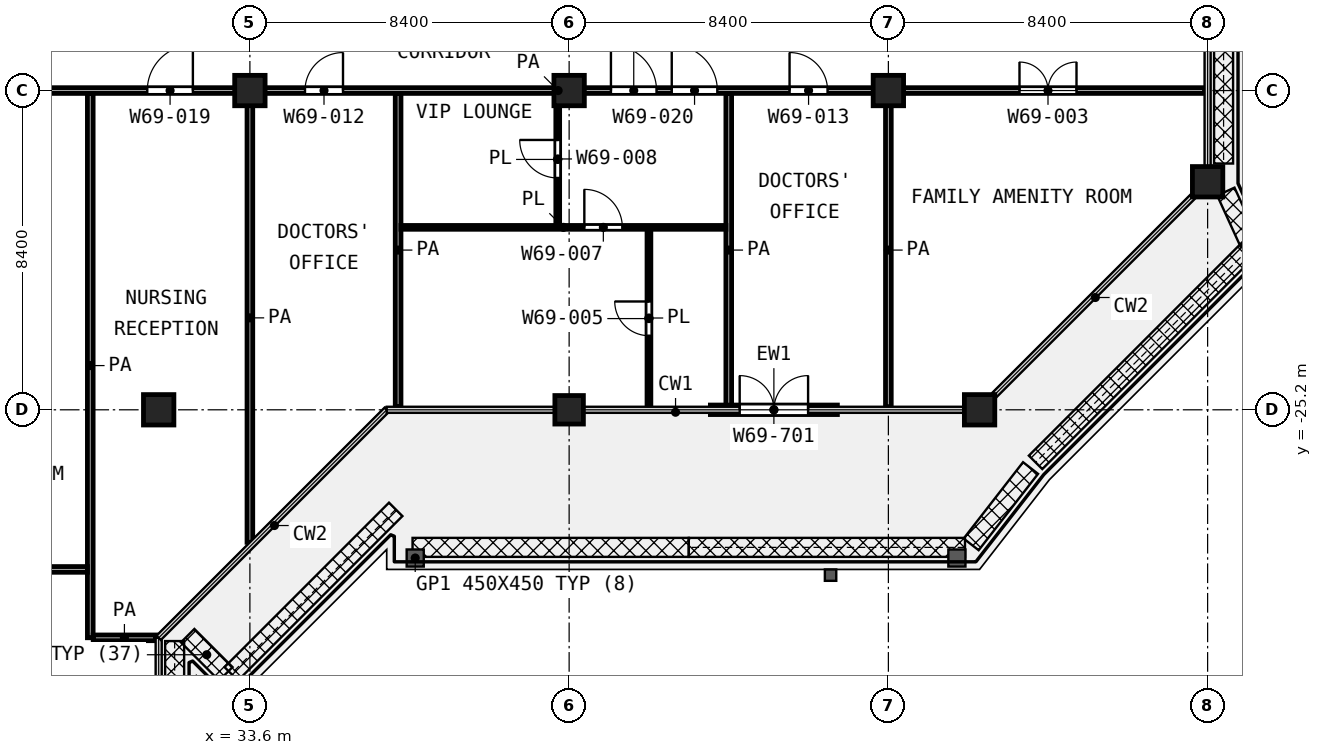
"""IFC4 building model, lengths in metres.
Left out: names, types, materials, properties, quantities, classifications, styles, units other than length and angle.
Written with IfcOpenShell. Run it as: python <this file> out.ifc"""

import sys

from ifc_helpers import new_model, si_unit, direction, frame, frame_2d, origin, origin_2d, place, context, subcontext, project, spatial, rectangle, extrude, element, fill, save


model = new_model("IFC4")
c1 = context("Model", 3, precision=1e-05, world=origin(), true_north=direction((0.0, 1.0)))
c2 = subcontext(c1, "Body", "Model", "MODEL_VIEW")
j1 = project(units=[si_unit("LENGTHUNIT", "METRE"), si_unit("PLANEANGLEUNIT", "RADIAN")], contexts=[c1])
p1 = place(None, origin())
s1 = spatial("IfcSite", under=j1, at=p1, CompositionType="ELEMENT")
p2 = place(p1, origin())
s2 = spatial("IfcBuilding", under=s1, at=p2, CompositionType="ELEMENT")
p3 = place(p2, frame((0.0, 0.0, 298.6)))
s3 = spatial("IfcBuildingStorey", under=s2, at=p3, CompositionType="ELEMENT", Elevation=298.6)
for number, where, z_axis, x_axis in (
    (1, (33.6, -16.8, 0.0), (0.0, 0.0, 1.0), (1.0, 0.0, 0.0)),
    (2, (42.0, -16.8, 0.0), (0.0, 0.0, 1.0), (1.0, 0.0, 0.0)),
    (3, (50.4, -16.8, 0.0), (0.0, 0.0, 1.0), (1.0, 0.0, 0.0)),
    (4, (58.8, -19.2, 0.0), (0.0, 0.0, 1.0), (1.0, 0.0, 0.0)),
    (5, (31.2, -25.2, 0.0), (0.0, 0.0, 1.0), (1.0, 0.0, 0.0)),
):
    element("IfcColumn", number, at=place(p3, frame(where, z_axis=z_axis, x_axis=x_axis)), inside=s3, PredefinedType="COLUMN", context=c2, shape_type="SweptSolid", body=[
        extrude(rectangle(XDim=0.8, YDim=0.8, at=origin_2d()), origin(), (0.0, 0.0, 1.0), 4.2),
    ])
p4 = place(p3, frame((42.0, -25.2, 0.0), z_axis=(0.0, 0.0, 1.0), x_axis=(1.0, 0.0, 0.0)))
e6 = element("IfcColumn", 6, at=p4, inside=s3, PredefinedType="COLUMN", context=c2, shape_type="SweptSolid", body=[
    extrude(rectangle(XDim=0.75, YDim=0.75, at=origin_2d()), origin(), (0.0, 0.0, 1.0), 4.2),
])
p5 = place(p3, frame((52.8, -25.2, 0.0), z_axis=(0.0, 0.0, 1.0), x_axis=(1.0, 0.0, 0.0)))
e7 = element("IfcColumn", 7, at=p5, inside=s3, PredefinedType="COLUMN", context=c2, shape_type="SweptSolid", body=[
    extrude(rectangle(XDim=0.8, YDim=0.8, at=origin_2d()), origin(), (0.0, 0.0, 1.0), 4.2),
])
p6 = place(p3, frame((45.717, -25.2, 0.0), z_axis=(0.0, 0.0, 1.0), x_axis=(1.0, 0.0, 0.0)))
e8 = element("IfcWall", 8, at=p6, inside=s3, PredefinedType="SOLIDWALL", context=c2, shape_type="SweptSolid", body=[
    extrude(rectangle(XDim=3.342, YDim=0.25, at=frame_2d((1.671, 0.0))), origin(), (0.0, 0.0, 1.0), 3.48),
])
p7 = place(p6, frame((0.771, 0.0, 0.0)))
e9 = element("IfcOpeningElement", 9, at=p7, cuts=e8, PredefinedType="OPENING", context=c2, shape_type="SweptSolid", body=[
    extrude(rectangle(XDim=1.8, YDim=2.1, at=frame_2d((0.9, 1.05))), frame((0.0, 0.135, 0.0), z_axis=(0.0, -1.0, 0.0), x_axis=(1.0, 0.0, 0.0)), (0.0, 0.0, 1.0), 0.27),
])
p8 = place(p3, frame((37.575, -20.4, 0.0), z_axis=(0.0, 0.0, 1.0), x_axis=(1.0, 0.0, 0.0)))
e10 = element("IfcWall", 10, at=p8, inside=s3, PredefinedType="PARTITIONING", context=c2, shape_type="SweptSolid", body=[
    extrude(rectangle(XDim=8.55, YDim=0.1, at=frame_2d((4.275, 0.0))), origin(), (0.0, 0.0, 1.0), 3.6),
])
p9 = place(p8, frame((4.825, 0.0, 0.0)))
e11 = element("IfcOpeningElement", 11, at=p9, cuts=e10, PredefinedType="OPENING", context=c2, shape_type="SweptSolid", body=[
    extrude(rectangle(XDim=1.0, YDim=2.1, at=frame_2d((0.5, 1.05))), frame((0.0, 0.06, 0.0), z_axis=(0.0, -1.0, 0.0), x_axis=(1.0, 0.0, 0.0)), (0.0, 0.0, 1.0), 0.12),
])
p10 = place(p3, frame((41.7, -20.35, 0.0), z_axis=(0.0, 0.0, 1.0), x_axis=(0.0, 1.0, 0.0)))
e12 = element("IfcWall", 12, at=p10, inside=s3, PredefinedType="PARTITIONING", context=c2, shape_type="SweptSolid", body=[
    extrude(rectangle(XDim=3.475, YDim=0.1, at=frame_2d((1.738, 0.0))), origin(), (0.0, 0.0, 1.0), 3.6),
])
p11 = place(p10, frame((1.25, 0.0, 0.0)))
e13 = element("IfcOpeningElement", 13, at=p11, cuts=e12, PredefinedType="OPENING", context=c2, shape_type="SweptSolid", body=[
    extrude(rectangle(XDim=1.0, YDim=2.1, at=frame_2d((0.5, 1.05))), frame((0.0, 0.06, 0.0), z_axis=(0.0, -1.0, 0.0), x_axis=(1.0, 0.0, 0.0)), (0.0, 0.0, 1.0), 0.12),
])
p12 = place(p3, frame((44.1, -25.12, 0.0), z_axis=(0.0, 0.0, 1.0), x_axis=(0.0, 1.0, 0.0)))
e14 = element("IfcWall", 14, at=p12, inside=s3, PredefinedType="PARTITIONING", context=c2, shape_type="SweptSolid", body=[
    extrude(rectangle(XDim=4.67, YDim=0.1, at=frame_2d((2.335, 0.0))), origin(), (0.0, 0.0, 1.0), 3.6),
])
p13 = place(p12, frame((1.87, 0.0, 0.0)))
e15 = element("IfcOpeningElement", 15, at=p13, cuts=e14, PredefinedType="OPENING", context=c2, shape_type="SweptSolid", body=[
    extrude(rectangle(XDim=0.9, YDim=2.1, at=frame_2d((0.45, 1.05))), frame((0.0, 0.06, 0.0), z_axis=(0.0, -1.0, 0.0), x_axis=(1.0, 0.0, 0.0)), (0.0, 0.0, 1.0), 0.12),
])
p14 = place(p3, frame((29.477, -31.2, 0.0), z_axis=(0.0, 0.0, 1.0), x_axis=(1.0, 0.0, 0.0)))
e16 = element("IfcWall", 16, at=p14, inside=s3, PredefinedType="PARTITIONING", context=c2, shape_type="SweptSolid", body=[
    extrude(rectangle(XDim=1.643, YDim=0.15, at=frame_2d((0.822, 0.0))), origin(), (0.0, 0.0, 1.0), 3.6),
])
p15 = place(p3, frame((16.875, -29.4, 0.0), z_axis=(0.0, 0.0, 1.0), x_axis=(1.0, 0.0, 0.0)))
e17 = element("IfcWall", 17, at=p15, inside=s3, PredefinedType="PARTITIONING", context=c2, shape_type="SweptSolid", body=[
    extrude(rectangle(XDim=12.45, YDim=0.15, at=frame_2d((6.225, 0.0))), origin(), (0.0, 0.0, 1.0), 3.6),
])
p16 = place(p3, frame((24.7, -16.8, 0.0), z_axis=(0.0, 0.0, 1.0), x_axis=(1.0, 0.0, 0.0)))
e18 = element("IfcWall", 18, at=p16, inside=s3, PredefinedType="PARTITIONING", context=c2, shape_type="SweptSolid", body=[
    extrude(rectangle(XDim=34.02, YDim=0.15, at=frame_2d((17.01, 0.0))), origin(), (0.0, 0.0, 1.0), 3.6),
])
p17 = place(p16, frame((1.85, 0.0, 0.0)))
e19 = element("IfcOpeningElement", 19, at=p17, cuts=e18, PredefinedType="OPENING", context=c2, shape_type="SweptSolid", body=[
    extrude(rectangle(XDim=1.5, YDim=2.1, at=frame_2d((0.75, 1.05))), frame((0.0, 0.085, 0.0), z_axis=(0.0, -1.0, 0.0), x_axis=(1.0, 0.0, 0.0)), (0.0, 0.0, 1.0), 0.17),
])
p18 = place(p16, frame((6.2, 0.0, 0.0)))
e20 = element("IfcOpeningElement", 20, at=p18, cuts=e18, PredefinedType="OPENING", context=c2, shape_type="SweptSolid", body=[
    extrude(rectangle(XDim=1.2, YDim=2.1, at=frame_2d((0.6, 1.05))), frame((0.0, 0.085, 0.0), z_axis=(0.0, -1.0, 0.0), x_axis=(1.0, 0.0, 0.0)), (0.0, 0.0, 1.0), 0.17),
])
p19 = place(p16, frame((10.35, 0.0, 0.0)))
e21 = element("IfcOpeningElement", 21, at=p19, cuts=e18, PredefinedType="OPENING", context=c2, shape_type="SweptSolid", body=[
    extrude(rectangle(XDim=1.0, YDim=2.1, at=frame_2d((0.5, 1.05))), frame((0.0, 0.085, 0.0), z_axis=(0.0, -1.0, 0.0), x_axis=(1.0, 0.0, 0.0)), (0.0, 0.0, 1.0), 0.17),
])
p20 = place(p16, frame((20.0, 0.0, 0.0)))
e22 = element("IfcOpeningElement", 22, at=p20, cuts=e18, PredefinedType="OPENING", context=c2, shape_type="SweptSolid", body=[
    extrude(rectangle(XDim=1.2, YDim=2.1, at=frame_2d((0.6, 1.05))), frame((0.0, 0.085, 0.0), z_axis=(0.0, -1.0, 0.0), x_axis=(1.0, 0.0, 0.0)), (0.0, 0.0, 1.0), 0.17),
])
p21 = place(p16, frame((18.4, 0.0, 0.0)))
e23 = element("IfcOpeningElement", 23, at=p21, cuts=e18, PredefinedType="OPENING", context=c2, shape_type="SweptSolid", body=[
    extrude(rectangle(XDim=1.2, YDim=2.1, at=frame_2d((0.6, 1.05))), frame((0.0, 0.085, 0.0), z_axis=(0.0, -1.0, 0.0), x_axis=(1.0, 0.0, 0.0)), (0.0, 0.0, 1.0), 0.17),
])
p22 = place(p16, frame((23.1, 0.0, 0.0)))
e24 = element("IfcOpeningElement", 24, at=p22, cuts=e18, PredefinedType="OPENING", context=c2, shape_type="SweptSolid", body=[
    extrude(rectangle(XDim=1.0, YDim=2.1, at=frame_2d((0.5, 1.05))), frame((0.0, 0.085, 0.0), z_axis=(0.0, -1.0, 0.0), x_axis=(1.0, 0.0, 0.0)), (0.0, 0.0, 1.0), 0.17),
])
p23 = place(p16, frame((29.15, 0.0, 0.0)))
e25 = element("IfcOpeningElement", 25, at=p23, cuts=e18, PredefinedType="OPENING", context=c2, shape_type="SweptSolid", body=[
    extrude(rectangle(XDim=1.5, YDim=2.1, at=frame_2d((0.75, 1.05))), frame((0.0, 0.085, 0.0), z_axis=(0.0, -1.0, 0.0), x_axis=(1.0, 0.0, 0.0)), (0.0, 0.0, 1.0), 0.17),
])
p24 = place(p3, frame((29.4, -31.198, 0.0), z_axis=(0.0, 0.0, 1.0), x_axis=(0.0, 1.0, 0.0)))
e26 = element("IfcWall", 26, at=p24, inside=s3, PredefinedType="PARTITIONING", context=c2, shape_type="SweptSolid", body=[
    extrude(rectangle(XDim=14.323, YDim=0.15, at=frame_2d((7.162, 0.0))), origin(), (0.0, 0.0, 1.0), 3.6),
])
p25 = place(p3, frame((33.6, -28.687, 0.0), z_axis=(0.0, 0.0, 1.0), x_axis=(0.0, 1.0, 0.0)))
e27 = element("IfcWall", 27, at=p25, inside=s3, PredefinedType="PARTITIONING", context=c2, shape_type="SweptSolid", body=[
    extrude(rectangle(XDim=11.812, YDim=0.15, at=frame_2d((5.906, 0.0))), origin(), (0.0, 0.0, 1.0), 3.6),
])
for number, where, z_axis, x_axis in (
    (28, (37.5, -25.12, 0.0), (0.0, 0.0, 1.0), (0.0, 1.0, 0.0)),
    (29, (46.2, -25.12, 0.0), (0.0, 0.0, 1.0), (0.0, 1.0, 0.0)),
    (30, (50.4, -25.12, 0.0), (0.0, 0.0, 1.0), (0.0, 1.0, 0.0)),
):
    element("IfcWall", number, at=place(p3, frame(where, z_axis=z_axis, x_axis=x_axis)), inside=s3, PredefinedType="PARTITIONING", context=c2, shape_type="SweptSolid", body=[
        extrude(rectangle(XDim=8.245, YDim=0.15, at=frame_2d((4.123, 0.0))), origin(), (0.0, 0.0, 1.0), 3.6),
    ])
p26 = place(p7, origin())
e31 = element("IfcDoor", 31, at=p26, inside=s3, OperationType="DOUBLE_DOOR_SINGLE_SWING", PredefinedType="DOOR", context=c2, shape_type="SweptSolid", body=[
    extrude(rectangle(XDim=1.8, YDim=2.1, at=frame_2d((0.9, 1.05))), frame((0.0, 0.025, 0.0), z_axis=(0.0, -1.0, 0.0), x_axis=(1.0, 0.0, 0.0)), (0.0, 0.0, 1.0), 0.05),
])
fill(e9, e31)
p27 = place(p18, origin())
e32 = element("IfcDoor", 32, at=p27, inside=s3, OperationType="SINGLE_SWING_RIGHT", PredefinedType="DOOR", context=c2, shape_type="SweptSolid", body=[
    extrude(rectangle(XDim=1.2, YDim=2.1, at=frame_2d((0.6, 1.05))), frame((0.0, 0.025, 0.0), z_axis=(0.0, -1.0, 0.0), x_axis=(1.0, 0.0, 0.0)), (0.0, 0.0, 1.0), 0.05),
])
fill(e20, e32)
p28 = place(p19, origin())
e33 = element("IfcDoor", 33, at=p28, inside=s3, OperationType="SINGLE_SWING_RIGHT", PredefinedType="DOOR", context=c2, shape_type="SweptSolid", body=[
    extrude(rectangle(XDim=1.0, YDim=2.1, at=frame_2d((0.5, 1.05))), frame((0.0, 0.025, 0.0), z_axis=(0.0, -1.0, 0.0), x_axis=(1.0, 0.0, 0.0)), (0.0, 0.0, 1.0), 0.05),
])
fill(e21, e33)
p29 = place(p20, origin())
e34 = element("IfcDoor", 34, at=p29, inside=s3, OperationType="SINGLE_SWING_LEFT", PredefinedType="DOOR", context=c2, shape_type="SweptSolid", body=[
    extrude(rectangle(XDim=1.2, YDim=2.1, at=frame_2d((0.6, 1.05))), frame((0.0, 0.025, 0.0), z_axis=(0.0, -1.0, 0.0), x_axis=(1.0, 0.0, 0.0)), (0.0, 0.0, 1.0), 0.05),
])
fill(e22, e34)
p30 = place(p21, origin())
e35 = element("IfcDoor", 35, at=p30, inside=s3, OperationType="SINGLE_SWING_LEFT", PredefinedType="DOOR", context=c2, shape_type="SweptSolid", body=[
    extrude(rectangle(XDim=1.2, YDim=2.1, at=frame_2d((0.6, 1.05))), frame((0.0, 0.025, 0.0), z_axis=(0.0, -1.0, 0.0), x_axis=(1.0, 0.0, 0.0)), (0.0, 0.0, 1.0), 0.05),
])
fill(e23, e35)
p31 = place(p9, origin())
e36 = element("IfcDoor", 36, at=p31, inside=s3, OperationType="SINGLE_SWING_LEFT", PredefinedType="DOOR", context=c2, shape_type="SweptSolid", body=[
    extrude(rectangle(XDim=1.0, YDim=2.1, at=frame_2d((0.5, 1.05))), frame((0.0, 0.025, 0.0), z_axis=(0.0, -1.0, 0.0), x_axis=(1.0, 0.0, 0.0)), (0.0, 0.0, 1.0), 0.05),
])
fill(e11, e36)
p32 = place(p11, origin())
e37 = element("IfcDoor", 37, at=p32, inside=s3, OperationType="SINGLE_SWING_RIGHT", PredefinedType="DOOR", context=c2, shape_type="SweptSolid", body=[
    extrude(rectangle(XDim=1.0, YDim=2.1, at=frame_2d((0.5, 1.05))), frame((0.0, 0.025, 0.0), z_axis=(0.0, -1.0, 0.0), x_axis=(1.0, 0.0, 0.0)), (0.0, 0.0, 1.0), 0.05),
])
fill(e13, e37)
p33 = place(p13, origin())
e38 = element("IfcDoor", 38, at=p33, inside=s3, OperationType="SINGLE_SWING_RIGHT", PredefinedType="DOOR", context=c2, shape_type="SweptSolid", body=[
    extrude(rectangle(XDim=0.9, YDim=2.1, at=frame_2d((0.45, 1.05))), frame((0.0, 0.025, 0.0), z_axis=(0.0, -1.0, 0.0), x_axis=(1.0, 0.0, 0.0)), (0.0, 0.0, 1.0), 0.05),
])
fill(e15, e38)
p34 = place(p22, origin())
e39 = element("IfcDoor", 39, at=p34, inside=s3, OperationType="SINGLE_SWING_LEFT", PredefinedType="DOOR", context=c2, shape_type="SweptSolid", body=[
    extrude(rectangle(XDim=1.0, YDim=2.1, at=frame_2d((0.5, 1.05))), frame((0.0, 0.025, 0.0), z_axis=(0.0, -1.0, 0.0), x_axis=(1.0, 0.0, 0.0)), (0.0, 0.0, 1.0), 0.05),
])
fill(e24, e39)
p35 = place(p23, origin())
e40 = element("IfcDoor", 40, at=p35, inside=s3, OperationType="DOUBLE_DOOR_SINGLE_SWING", PredefinedType="DOOR", context=c2, shape_type="SweptSolid", body=[
    extrude(rectangle(XDim=1.5, YDim=2.1, at=frame_2d((0.75, 1.05))), frame((0.0, 0.025, 0.0), z_axis=(0.0, -1.0, 0.0), x_axis=(1.0, 0.0, 0.0)), (0.0, 0.0, 1.0), 0.05),
])
fill(e25, e40)
save(model, sys.argv[1])
